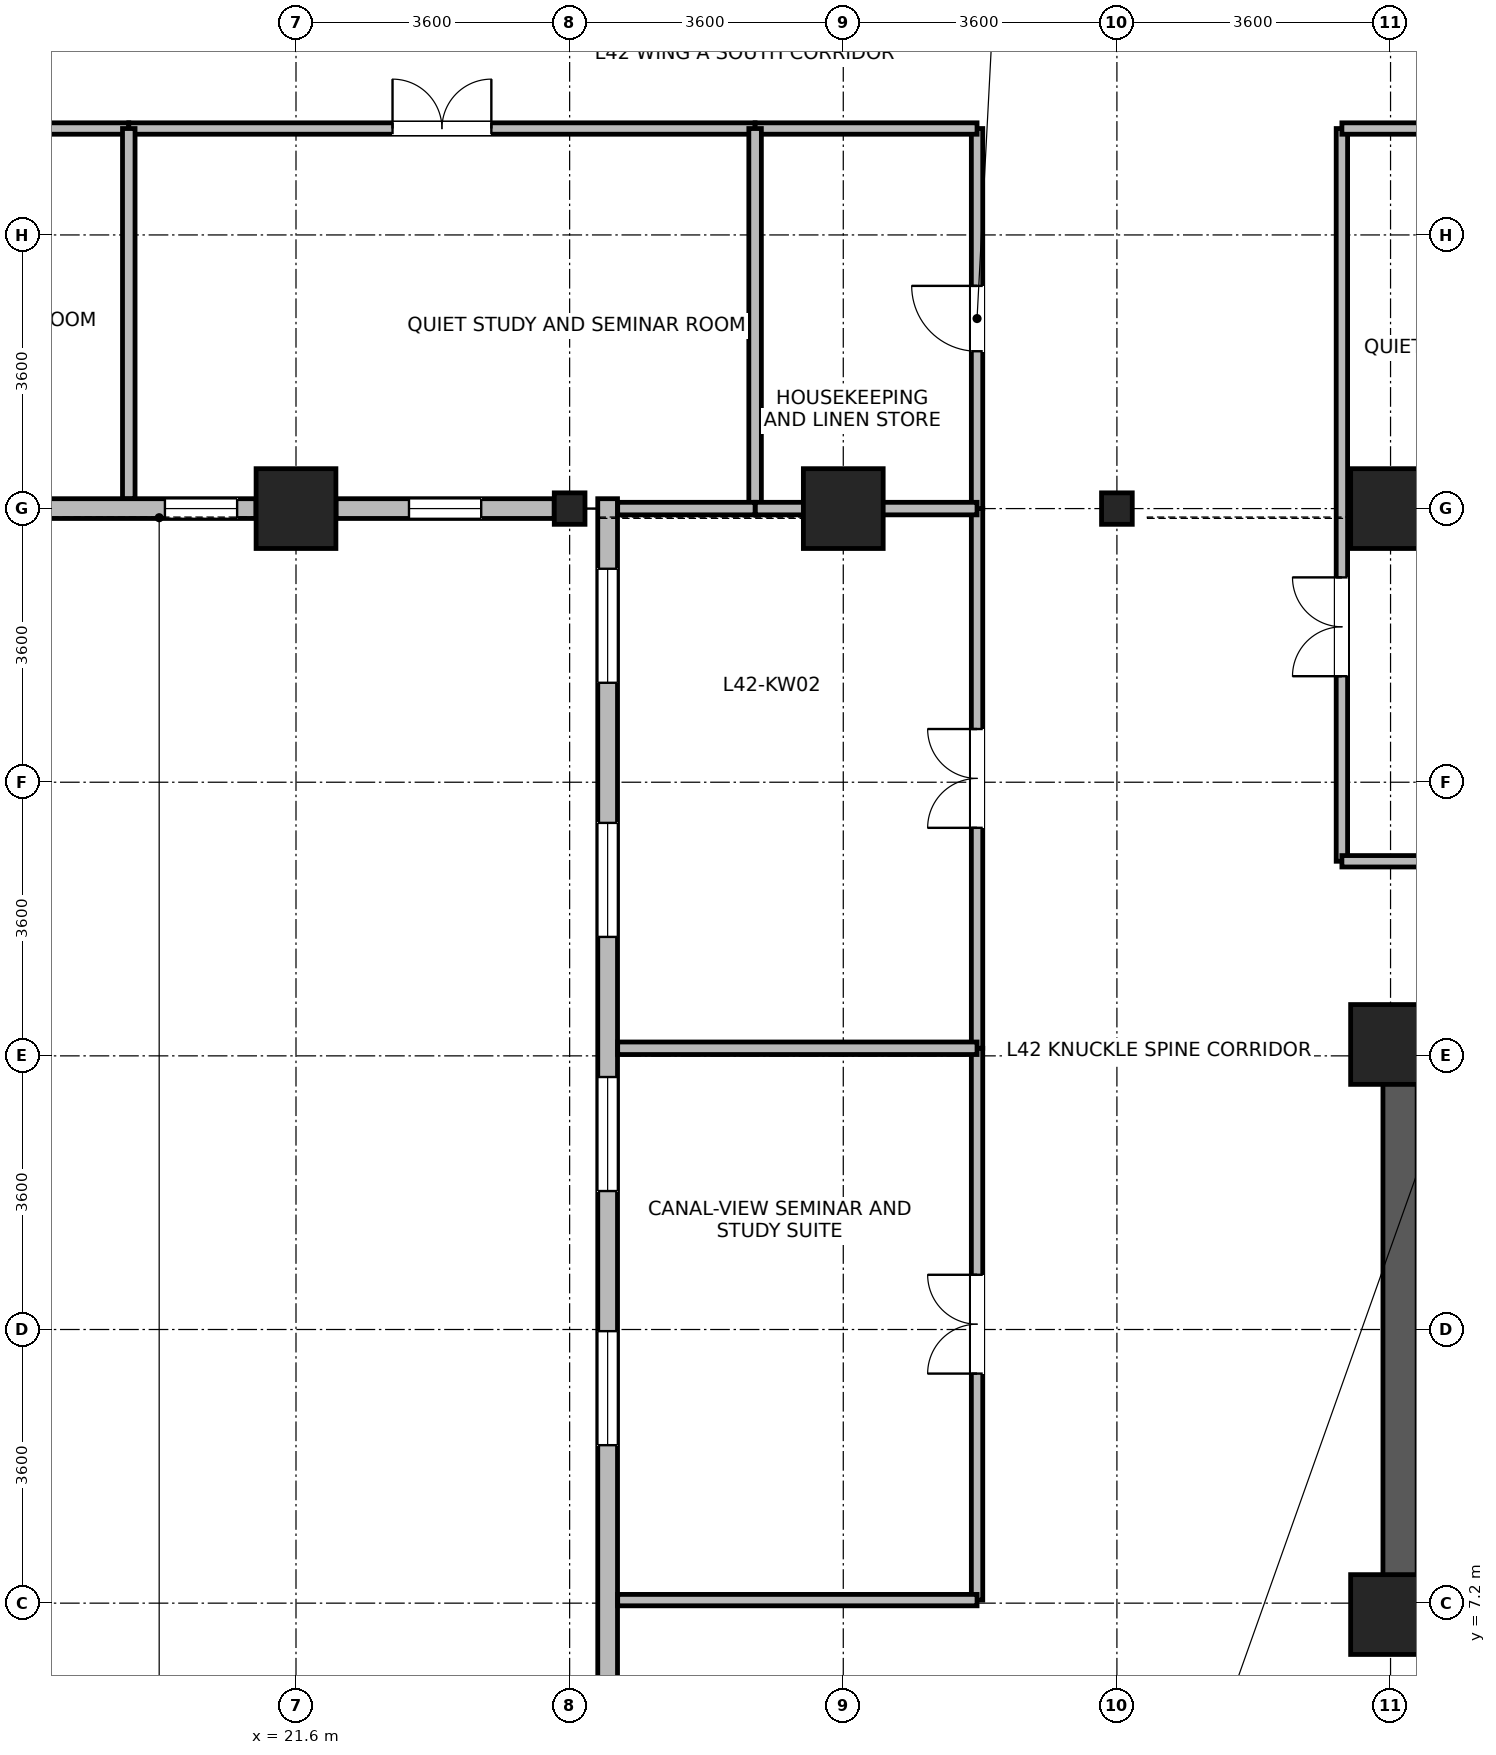
"""IFC4 building model, lengths in metres.
Left out: names, types, materials, properties, quantities, classifications, styles, units other than length and angle.
Written with IfcOpenShell. Run it as: python <this file> out.ifc"""

import sys

from ifc_helpers import new_model, si_unit, direction, frame, frame_2d, origin, origin_2d, place, context, subcontext, project, spatial, rectangle, i_section, extrude, source, transform, mapped, element, fill, save


model = new_model("IFC4")
c1 = context("Model", 3, precision=1e-05, world=origin(), true_north=direction((0.0, 1.0)))
c2 = subcontext(c1, "Body", "Model", "MODEL_VIEW")
j1 = project(units=[si_unit("LENGTHUNIT", "METRE"), si_unit("PLANEANGLEUNIT", "RADIAN")], contexts=[c1])
p1 = place(None, origin())
s1 = spatial("IfcSite", under=j1, at=p1, CompositionType="ELEMENT")
p2 = place(p1, origin())
s2 = spatial("IfcBuilding", under=s1, at=p2, CompositionType="ELEMENT")
p3 = place(p2, frame((0.0, 0.0, 166.1)))
s3 = spatial("IfcBuildingStorey", under=s2, at=p3, CompositionType="ELEMENT", Elevation=166.1)
p4 = place(p3, frame((36.125, 6.85, 0.0), z_axis=(0.0, 0.0, 1.0), x_axis=(0.0, 1.0, 0.0)))
e1 = element("IfcWall", 1, at=p4, inside=s3, PredefinedType="SHEAR", context=c2, shape_type="SweptSolid", body=[
    extrude(rectangle(XDim=7.9, YDim=0.45, at=frame_2d((3.95, 0.0))), origin(), (0.0, 0.0, 1.0), 3.46),
])
m1 = source(origin(), c2, "Body", "SweptSolid", [
    extrude(rectangle(XDim=1.05, YDim=1.05, at=origin_2d()), origin(), (0.0, 0.0, 1.0), 3.7),
])
for number, where, z_axis, x_axis in (
    (2, (21.6, 21.6, 0.0), (0.0, 0.0, 1.0), (1.0, 0.0, 0.0)),
    (3, (28.8, 21.6, 0.0), (0.0, 0.0, 1.0), (1.0, 0.0, 0.0)),
    (4, (36.0, 21.6, 0.0), (0.0, 0.0, 1.0), (1.0, 0.0, 0.0)),
    (5, (36.0, 7.05, 0.0), (0.0, 0.0, 1.0), (1.0, 0.0, 0.0)),
    (6, (36.0, 14.55, 0.0), (0.0, 0.0, 1.0), (1.0, 0.0, 0.0)),
):
    element("IfcColumn", number, at=place(p3, frame(where, z_axis=z_axis, x_axis=x_axis)), inside=s3, PredefinedType="COLUMN", context=c2, shape_type="MappedRepresentation", body=[
        mapped(m1, transform((0.0, 0.0, 0.0), x_axis=(1.0, 0.0, 0.0), y_axis=(0.0, 1.0, 0.0), z_axis=(0.0, 0.0, 1.0), scale=1.0)),
    ])
m2 = source(origin(), c2, "Body", "SweptSolid", [
    extrude(i_section(OverallWidth=0.404, OverallDepth=0.414, WebThickness=0.021, FlangeThickness=0.028, FilletRadius=0.015, at=origin_2d()), origin(), (0.0, 0.0, 1.0), 3.7),
])
for number, where, z_axis, x_axis in (
    (7, (25.2, 21.6, 0.0), (0.0, 0.0, 1.0), (1.0, 0.0, 0.0)),
    (8, (32.4, 21.6, 0.0), (0.0, 0.0, 1.0), (1.0, 0.0, 0.0)),
):
    element("IfcColumn", number, at=place(p3, frame(where, z_axis=z_axis, x_axis=x_axis)), inside=s3, PredefinedType="COLUMN", context=c2, shape_type="MappedRepresentation", body=[
        mapped(m2, transform((0.0, 0.0, 0.0), x_axis=(1.0, 0.0, 0.0), y_axis=(0.0, 1.0, 0.0), z_axis=(0.0, 0.0, 1.0), scale=1.0)),
    ])
p5 = place(p3, frame((21.074, 21.6, 0.0), z_axis=(0.0, 0.0, 1.0), x_axis=(-1.0, 0.0, 0.0)))
e9 = element("IfcWall", 9, at=p5, inside=s3, PredefinedType="STANDARD", context=c2, shape_type="SweptSolid", body=[
    extrude(rectangle(XDim=2.871, YDim=0.26, at=frame_2d((1.436, 0.0))), origin(), (0.0, 0.0, 1.0), 2.99),
])
p6 = place(p5, frame((0.249, 0.0, 0.85)))
e10 = element("IfcOpeningElement", 10, at=p6, cuts=e9, PredefinedType="OPENING", context=c2, shape_type="SweptSolid", body=[
    extrude(rectangle(XDim=0.95, YDim=1.75, at=frame_2d((0.475, 0.875))), frame((0.0, 0.14, 0.0), z_axis=(0.0, -1.0, 0.0), x_axis=(1.0, 0.0, 0.0)), (0.0, 0.0, 1.0), 0.28),
])
p7 = place(p3, frame((24.997, 21.6, 0.0), z_axis=(0.0, 0.0, 1.0), x_axis=(-1.0, 0.0, 0.0)))
e11 = element("IfcWall", 11, at=p7, inside=s3, PredefinedType="STANDARD", context=c2, shape_type="SweptSolid", body=[
    extrude(rectangle(XDim=2.871, YDim=0.26, at=frame_2d((1.436, 0.0))), origin(), (0.0, 0.0, 1.0), 2.99),
])
p8 = place(p7, frame((0.96, 0.0, 0.85)))
e12 = element("IfcOpeningElement", 12, at=p8, cuts=e11, PredefinedType="OPENING", context=c2, shape_type="SweptSolid", body=[
    extrude(rectangle(XDim=0.95, YDim=1.75, at=frame_2d((0.475, 0.875))), frame((0.0, 0.14, 0.0), z_axis=(0.0, -1.0, 0.0), x_axis=(1.0, 0.0, 0.0)), (0.0, 0.0, 1.0), 0.28),
])
p9 = place(p3, frame((25.7, 1.67, 0.0), z_axis=(0.0, 0.0, 1.0), x_axis=(0.0, 1.0, 0.0)))
e13 = element("IfcWall", 13, at=p9, inside=s3, PredefinedType="STANDARD", context=c2, shape_type="SweptSolid", body=[
    extrude(rectangle(XDim=20.06, YDim=0.26, at=frame_2d((10.03, 0.0))), origin(), (0.0, 0.0, 1.0), 3.44),
])
p10 = place(p9, frame((0.922, 0.0, 0.85)))
e14 = element("IfcOpeningElement", 14, at=p10, cuts=e13, PredefinedType="OPENING", context=c2, shape_type="SweptSolid", body=[
    extrude(rectangle(XDim=1.5, YDim=1.85, at=frame_2d((0.75, 0.925))), frame((0.0, 0.14, 0.0), z_axis=(0.0, -1.0, 0.0), x_axis=(1.0, 0.0, 0.0)), (0.0, 0.0, 1.0), 0.28),
])
p11 = place(p9, frame((7.608, 0.0, 0.85)))
e15 = element("IfcOpeningElement", 15, at=p11, cuts=e13, PredefinedType="OPENING", context=c2, shape_type="SweptSolid", body=[
    extrude(rectangle(XDim=1.5, YDim=1.85, at=frame_2d((0.75, 0.925))), frame((0.0, 0.14, 0.0), z_axis=(0.0, -1.0, 0.0), x_axis=(1.0, 0.0, 0.0)), (0.0, 0.0, 1.0), 0.28),
])
p12 = place(p9, frame((10.952, 0.0, 0.85)))
e16 = element("IfcOpeningElement", 16, at=p12, cuts=e13, PredefinedType="OPENING", context=c2, shape_type="SweptSolid", body=[
    extrude(rectangle(XDim=1.5, YDim=1.85, at=frame_2d((0.75, 0.925))), frame((0.0, 0.14, 0.0), z_axis=(0.0, -1.0, 0.0), x_axis=(1.0, 0.0, 0.0)), (0.0, 0.0, 1.0), 0.28),
])
p13 = place(p9, frame((14.295, 0.0, 0.85)))
e17 = element("IfcOpeningElement", 17, at=p13, cuts=e13, PredefinedType="OPENING", context=c2, shape_type="SweptSolid", body=[
    extrude(rectangle(XDim=1.5, YDim=1.85, at=frame_2d((0.75, 0.925))), frame((0.0, 0.14, 0.0), z_axis=(0.0, -1.0, 0.0), x_axis=(1.0, 0.0, 0.0)), (0.0, 0.0, 1.0), 0.28),
])
p14 = place(p9, frame((17.638, 0.0, 0.85)))
e18 = element("IfcOpeningElement", 18, at=p14, cuts=e13, PredefinedType="OPENING", context=c2, shape_type="SweptSolid", body=[
    extrude(rectangle(XDim=1.5, YDim=1.85, at=frame_2d((0.75, 0.925))), frame((0.0, 0.14, 0.0), z_axis=(0.0, -1.0, 0.0), x_axis=(1.0, 0.0, 0.0)), (0.0, 0.0, 1.0), 0.28),
])
p15 = place(p3, frame((35.36, 16.96, 0.0), z_axis=(0.0, 0.0, 1.0), x_axis=(0.0, 1.0, 0.0)))
e19 = element("IfcWall", 19, at=p15, inside=s3, PredefinedType="PARTITIONING", context=c2, shape_type="SweptSolid", body=[
    extrude(rectangle(XDim=9.64, YDim=0.15, at=frame_2d((4.82, 0.0))), origin(), (0.0, 0.0, 1.0), 3.44),
])
p16 = place(p15, frame((2.435, 0.0, 0.0)))
e20 = element("IfcOpeningElement", 20, at=p16, cuts=e19, PredefinedType="OPENING", context=c2, shape_type="SweptSolid", body=[
    extrude(rectangle(XDim=1.3, YDim=2.12, at=frame_2d((0.65, 1.06))), frame((0.0, 0.085, 0.0), z_axis=(0.0, -1.0, 0.0), x_axis=(1.0, 0.0, 0.0)), (0.0, 0.0, 1.0), 0.17),
])
p17 = place(p3, frame((10.32, 26.6, 0.0), z_axis=(0.0, 0.0, 1.0), x_axis=(1.0, 0.0, 0.0)))
e21 = element("IfcWall", 21, at=p17, inside=s3, PredefinedType="PARTITIONING", context=c2, shape_type="SweptSolid", body=[
    extrude(rectangle(XDim=9.08, YDim=0.15, at=frame_2d((4.54, 0.0))), origin(), (0.0, 0.0, 1.0), 3.44),
])
p18 = place(p17, frame((4.065, 0.0, 0.0)))
e22 = element("IfcOpeningElement", 22, at=p18, cuts=e21, PredefinedType="OPENING", context=c2, shape_type="SweptSolid", body=[
    extrude(rectangle(XDim=0.95, YDim=2.1, at=frame_2d((0.475, 1.05))), frame((0.0, 0.085, 0.0), z_axis=(0.0, -1.0, 0.0), x_axis=(1.0, 0.0, 0.0)), (0.0, 0.0, 1.0), 0.17),
])
p19 = place(p3, frame((19.4, 26.6, 0.0), z_axis=(0.0, 0.0, 1.0), x_axis=(1.0, 0.0, 0.0)))
e23 = element("IfcWall", 23, at=p19, inside=s3, PredefinedType="PARTITIONING", context=c2, shape_type="SweptSolid", body=[
    extrude(rectangle(XDim=8.24, YDim=0.15, at=frame_2d((4.12, 0.0))), origin(), (0.0, 0.0, 1.0), 3.44),
])
p20 = place(p19, frame((3.47, 0.0, 0.0)))
e24 = element("IfcOpeningElement", 24, at=p20, cuts=e23, PredefinedType="OPENING", context=c2, shape_type="SweptSolid", body=[
    extrude(rectangle(XDim=1.3, YDim=2.12, at=frame_2d((0.65, 1.06))), frame((0.0, 0.085, 0.0), z_axis=(0.0, -1.0, 0.0), x_axis=(1.0, 0.0, 0.0)), (0.0, 0.0, 1.0), 0.17),
])
p21 = place(p3, frame((30.56, 7.24, 0.0), z_axis=(0.0, 0.0, 1.0), x_axis=(0.0, 1.0, 0.0)))
e25 = element("IfcWall", 25, at=p21, inside=s3, PredefinedType="PARTITIONING", context=c2, shape_type="SweptSolid", body=[
    extrude(rectangle(XDim=7.26, YDim=0.15, at=frame_2d((3.63, 0.0))), origin(), (0.0, 0.0, 1.0), 3.44),
])
p22 = place(p21, frame((2.98, 0.0, 0.0)))
e26 = element("IfcOpeningElement", 26, at=p22, cuts=e25, PredefinedType="OPENING", context=c2, shape_type="SweptSolid", body=[
    extrude(rectangle(XDim=1.3, YDim=2.12, at=frame_2d((0.65, 1.06))), frame((0.0, 0.085, 0.0), z_axis=(0.0, -1.0, 0.0), x_axis=(1.0, 0.0, 0.0)), (0.0, 0.0, 1.0), 0.17),
])
p23 = place(p3, frame((30.56, 14.5, 0.0), z_axis=(0.0, 0.0, 1.0), x_axis=(0.0, 1.0, 0.0)))
e27 = element("IfcWall", 27, at=p23, inside=s3, PredefinedType="PARTITIONING", context=c2, shape_type="SweptSolid", body=[
    extrude(rectangle(XDim=7.1, YDim=0.15, at=frame_2d((3.55, 0.0))), origin(), (0.0, 0.0, 1.0), 3.44),
])
p24 = place(p23, frame((2.9, 0.0, 0.0)))
e28 = element("IfcOpeningElement", 28, at=p24, cuts=e27, PredefinedType="OPENING", context=c2, shape_type="SweptSolid", body=[
    extrude(rectangle(XDim=1.3, YDim=2.12, at=frame_2d((0.65, 1.06))), frame((0.0, 0.085, 0.0), z_axis=(0.0, -1.0, 0.0), x_axis=(1.0, 0.0, 0.0)), (0.0, 0.0, 1.0), 0.17),
])
p25 = place(p3, frame((30.56, 21.6, 0.0), z_axis=(0.0, 0.0, 1.0), x_axis=(0.0, 1.0, 0.0)))
e29 = element("IfcWall", 29, at=p25, inside=s3, PredefinedType="PARTITIONING", context=c2, shape_type="SweptSolid", body=[
    extrude(rectangle(XDim=5.0, YDim=0.15, at=frame_2d((2.5, 0.0))), origin(), (0.0, 0.0, 1.0), 3.44),
])
p26 = place(p25, frame((2.07, 0.0, 0.0)))
e30 = element("IfcOpeningElement", 30, at=p26, cuts=e29, PredefinedType="OPENING", context=c2, shape_type="SweptSolid", body=[
    extrude(rectangle(XDim=0.86, YDim=2.02, at=frame_2d((0.43, 1.01))), frame((0.0, 0.085, 0.0), z_axis=(0.0, -1.0, 0.0), x_axis=(1.0, 0.0, 0.0)), (0.0, 0.0, 1.0), 0.17),
])
p27 = place(p3, frame((25.832, 7.24, 0.0), z_axis=(0.0, 0.0, 1.0), x_axis=(1.0, 0.0, 0.0)))
e31 = element("IfcWall", 31, at=p27, inside=s3, PredefinedType="PARTITIONING", context=c2, shape_type="SweptSolid", body=[
    extrude(rectangle(XDim=4.728, YDim=0.15, at=frame_2d((2.364, 0.0))), origin(), (0.0, 0.0, 1.0), 3.44),
])
for number, where, z_axis, x_axis in (
    (32, (35.36, 16.96, 0.0), (0.0, 0.0, 1.0), (1.0, 0.0, 0.0)),
    (33, (35.36, 26.6, 0.0), (0.0, 0.0, 1.0), (1.0, 0.0, 0.0)),
):
    element("IfcWall", number, at=place(p3, frame(where, z_axis=z_axis, x_axis=x_axis)), inside=s3, PredefinedType="PARTITIONING", context=c2, shape_type="SweptSolid", body=[
        extrude(rectangle(XDim=4.16, YDim=0.15, at=frame_2d((2.08, 0.0))), origin(), (0.0, 0.0, 1.0), 3.44),
    ])
p28 = place(p3, frame((27.64, 26.6, 0.0), z_axis=(0.0, 0.0, 1.0), x_axis=(1.0, 0.0, 0.0)))
e34 = element("IfcWall", 34, at=p28, inside=s3, PredefinedType="PARTITIONING", context=c2, shape_type="SweptSolid", body=[
    extrude(rectangle(XDim=2.92, YDim=0.15, at=frame_2d((1.46, 0.0))), origin(), (0.0, 0.0, 1.0), 3.44),
])
p29 = place(p3, frame((19.4, 21.732, 0.0), z_axis=(0.0, 0.0, 1.0), x_axis=(0.0, 1.0, 0.0)))
e35 = element("IfcWall", 35, at=p29, inside=s3, PredefinedType="PARTITIONING", context=c2, shape_type="SweptSolid", body=[
    extrude(rectangle(XDim=4.868, YDim=0.165, at=frame_2d((2.434, 0.0))), origin(), (0.0, 0.0, 1.0), 3.44),
])
p30 = place(p3, frame((27.64, 21.6, 0.0), z_axis=(0.0, 0.0, 1.0), x_axis=(0.0, 1.0, 0.0)))
e36 = element("IfcWall", 36, at=p30, inside=s3, PredefinedType="PARTITIONING", context=c2, shape_type="SweptSolid", body=[
    extrude(rectangle(XDim=5.0, YDim=0.165, at=frame_2d((2.5, 0.0))), origin(), (0.0, 0.0, 1.0), 3.44),
])
p31 = place(p3, frame((25.832, 14.5, 0.0), z_axis=(0.0, 0.0, 1.0), x_axis=(1.0, 0.0, 0.0)))
e37 = element("IfcWall", 37, at=p31, inside=s3, PredefinedType="PARTITIONING", context=c2, shape_type="SweptSolid", body=[
    extrude(rectangle(XDim=4.728, YDim=0.165, at=frame_2d((2.364, 0.0))), origin(), (0.0, 0.0, 1.0), 3.44),
])
p32 = place(p3, frame((27.64, 21.6, 0.0), z_axis=(0.0, 0.0, 1.0), x_axis=(1.0, 0.0, 0.0)))
e38 = element("IfcWall", 38, at=p32, inside=s3, PredefinedType="PARTITIONING", context=c2, shape_type="SweptSolid", body=[
    extrude(rectangle(XDim=2.92, YDim=0.165, at=frame_2d((1.46, 0.0))), origin(), (0.0, 0.0, 1.0), 2.99),
])
p33 = place(p3, frame((25.832, 21.6, 0.0), z_axis=(0.0, 0.0, 1.0), x_axis=(1.0, 0.0, 0.0)))
e39 = element("IfcWall", 39, at=p33, inside=s3, PredefinedType="PARTITIONING", context=c2, shape_type="SweptSolid", body=[
    extrude(rectangle(XDim=1.808, YDim=0.165, at=frame_2d((0.904, 0.0))), origin(), (0.0, 0.0, 1.0), 2.99),
])
p34 = place(p6, origin())
e40 = element("IfcWindow", 40, at=p34, inside=s3, PartitioningType="SINGLE_PANEL", PredefinedType="WINDOW", context=c2, shape_type="SweptSolid", body=[
    extrude(rectangle(XDim=0.95, YDim=1.75, at=frame_2d((0.475, 0.875))), frame((0.0, 0.03, 0.0), z_axis=(0.0, -1.0, 0.0), x_axis=(1.0, 0.0, 0.0)), (0.0, 0.0, 1.0), 0.06),
])
fill(e10, e40)
p35 = place(p8, origin())
e41 = element("IfcWindow", 41, at=p35, inside=s3, PartitioningType="SINGLE_PANEL", PredefinedType="WINDOW", context=c2, shape_type="SweptSolid", body=[
    extrude(rectangle(XDim=0.95, YDim=1.75, at=frame_2d((0.475, 0.875))), frame((0.0, 0.03, 0.0), z_axis=(0.0, -1.0, 0.0), x_axis=(1.0, 0.0, 0.0)), (0.0, 0.0, 1.0), 0.06),
])
fill(e12, e41)
p36 = place(p11, origin())
e42 = element("IfcWindow", 42, at=p36, inside=s3, PartitioningType="SINGLE_PANEL", PredefinedType="WINDOW", context=c2, shape_type="SweptSolid", body=[
    extrude(rectangle(XDim=1.5, YDim=1.85, at=frame_2d((0.75, 0.925))), frame((0.0, 0.03, 0.0), z_axis=(0.0, -1.0, 0.0), x_axis=(1.0, 0.0, 0.0)), (0.0, 0.0, 1.0), 0.06),
])
fill(e15, e42)
p37 = place(p12, origin())
e43 = element("IfcWindow", 43, at=p37, inside=s3, PartitioningType="SINGLE_PANEL", PredefinedType="WINDOW", context=c2, shape_type="SweptSolid", body=[
    extrude(rectangle(XDim=1.5, YDim=1.85, at=frame_2d((0.75, 0.925))), frame((0.0, 0.03, 0.0), z_axis=(0.0, -1.0, 0.0), x_axis=(1.0, 0.0, 0.0)), (0.0, 0.0, 1.0), 0.06),
])
fill(e16, e43)
p38 = place(p13, origin())
e44 = element("IfcWindow", 44, at=p38, inside=s3, PartitioningType="SINGLE_PANEL", PredefinedType="WINDOW", context=c2, shape_type="SweptSolid", body=[
    extrude(rectangle(XDim=1.5, YDim=1.85, at=frame_2d((0.75, 0.925))), frame((0.0, 0.03, 0.0), z_axis=(0.0, -1.0, 0.0), x_axis=(1.0, 0.0, 0.0)), (0.0, 0.0, 1.0), 0.06),
])
fill(e17, e44)
p39 = place(p14, origin())
e45 = element("IfcWindow", 45, at=p39, inside=s3, PartitioningType="SINGLE_PANEL", PredefinedType="WINDOW", context=c2, shape_type="SweptSolid", body=[
    extrude(rectangle(XDim=1.5, YDim=1.85, at=frame_2d((0.75, 0.925))), frame((0.0, 0.03, 0.0), z_axis=(0.0, -1.0, 0.0), x_axis=(1.0, 0.0, 0.0)), (0.0, 0.0, 1.0), 0.06),
])
fill(e18, e45)
p40 = place(p16, origin())
e46 = element("IfcDoor", 46, at=p40, inside=s3, OperationType="DOUBLE_DOOR_SINGLE_SWING", PredefinedType="DOOR", context=c2, shape_type="SweptSolid", body=[
    extrude(rectangle(XDim=1.3, YDim=2.12, at=frame_2d((0.65, 1.06))), frame((0.0, 0.025, 0.0), z_axis=(0.0, -1.0, 0.0), x_axis=(1.0, 0.0, 0.0)), (0.0, 0.0, 1.0), 0.05),
])
fill(e20, e46)
p41 = place(p20, origin())
e47 = element("IfcDoor", 47, at=p41, inside=s3, OperationType="DOUBLE_DOOR_SINGLE_SWING", PredefinedType="DOOR", context=c2, shape_type="SweptSolid", body=[
    extrude(rectangle(XDim=1.3, YDim=2.12, at=frame_2d((0.65, 1.06))), frame((0.0, 0.025, 0.0), z_axis=(0.0, -1.0, 0.0), x_axis=(1.0, 0.0, 0.0)), (0.0, 0.0, 1.0), 0.05),
])
fill(e24, e47)
p42 = place(p22, origin())
e48 = element("IfcDoor", 48, at=p42, inside=s3, OperationType="DOUBLE_DOOR_SINGLE_SWING", PredefinedType="DOOR", context=c2, shape_type="SweptSolid", body=[
    extrude(rectangle(XDim=1.3, YDim=2.12, at=frame_2d((0.65, 1.06))), frame((0.0, 0.025, 0.0), z_axis=(0.0, -1.0, 0.0), x_axis=(1.0, 0.0, 0.0)), (0.0, 0.0, 1.0), 0.05),
])
fill(e26, e48)
p43 = place(p24, origin())
e49 = element("IfcDoor", 49, at=p43, inside=s3, OperationType="DOUBLE_DOOR_SINGLE_SWING", PredefinedType="DOOR", context=c2, shape_type="SweptSolid", body=[
    extrude(rectangle(XDim=1.3, YDim=2.12, at=frame_2d((0.65, 1.06))), frame((0.0, 0.025, 0.0), z_axis=(0.0, -1.0, 0.0), x_axis=(1.0, 0.0, 0.0)), (0.0, 0.0, 1.0), 0.05),
])
fill(e28, e49)
p44 = place(p26, origin())
e50 = element("IfcDoor", 50, at=p44, inside=s3, OperationType="SINGLE_SWING_RIGHT", PredefinedType="DOOR", context=c2, shape_type="SweptSolid", body=[
    extrude(rectangle(XDim=0.86, YDim=2.02, at=frame_2d((0.43, 1.01))), frame((0.0, 0.025, 0.0), z_axis=(0.0, -1.0, 0.0), x_axis=(1.0, 0.0, 0.0)), (0.0, 0.0, 1.0), 0.05),
])
fill(e30, e50)
save(model, sys.argv[1])
